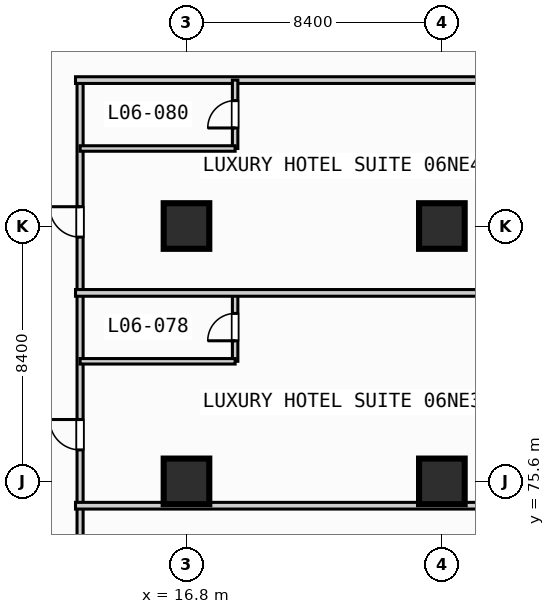
"""IFC4 building model, lengths in metres.
Left out: names, types, materials, properties, quantities, classifications, styles, units other than length and angle.
Written with IfcOpenShell. Run it as: python <this file> out.ifc"""

import sys

from ifc_helpers import new_model, si_unit, direction, frame, frame_2d, origin, origin_2d, place, context, subcontext, project, spatial, rectangle, extrude, element, fill, save


model = new_model("IFC4")
c1 = context("Model", 3, precision=1e-05, world=origin(), true_north=direction((0.0, 1.0)))
c2 = subcontext(c1, "Body", "Model", "MODEL_VIEW")
j1 = project(units=[si_unit("LENGTHUNIT", "METRE"), si_unit("PLANEANGLEUNIT", "RADIAN")], contexts=[c1])
p1 = place(None, origin())
s1 = spatial("IfcSite", under=j1, at=p1, CompositionType="ELEMENT")
p2 = place(p1, origin())
s2 = spatial("IfcBuilding", under=s1, at=p2, CompositionType="ELEMENT")
p3 = place(p2, frame((0.0, 0.0, 32.0)))
s3 = spatial("IfcBuildingStorey", under=s2, at=p3, CompositionType="ELEMENT", Elevation=32.0)
for number, where, z_axis, x_axis in (
    (1, (16.8, 75.6, 0.0), (0.0, 0.0, 1.0), (1.0, 0.0, 0.0)),
    (2, (16.8, 84.0, 0.0), (0.0, 0.0, 1.0), (1.0, 0.0, 0.0)),
    (3, (25.2, 75.6, 0.0), (0.0, 0.0, 1.0), (1.0, 0.0, 0.0)),
    (4, (25.2, 84.0, 0.0), (0.0, 0.0, 1.0), (1.0, 0.0, 0.0)),
):
    element("IfcColumn", number, at=place(p3, frame(where, z_axis=z_axis, x_axis=x_axis)), inside=s3, PredefinedType="COLUMN", context=c2, shape_type="SweptSolid", body=[
        extrude(rectangle(XDim=1.5, YDim=1.5, at=origin_2d()), origin(), (0.0, 0.0, 1.0), 3.8),
    ])
p4 = place(p3, frame((13.3, 61.6, 0.0), z_axis=(0.0, 0.0, 1.0), x_axis=(0.0, 1.0, 0.0)))
e5 = element("IfcWall", 5, at=p4, inside=s3, PredefinedType="PARTITIONING", context=c2, shape_type="SweptSolid", body=[
    extrude(rectangle(XDim=27.2, YDim=0.2, at=frame_2d((13.6, 0.0))), origin(), (0.0, 0.0, 1.0), 3.55),
])
p5 = place(p4, frame((3.965, 0.0, 0.0)))
e6 = element("IfcOpeningElement", 6, at=p5, cuts=e5, PredefinedType="OPENING", context=c2, shape_type="SweptSolid", body=[
    extrude(rectangle(XDim=1.0, YDim=2.15, at=frame_2d((0.5, 1.075))), frame((0.0, 0.11, 0.0), z_axis=(0.0, -1.0, 0.0), x_axis=(1.0, 0.0, 0.0)), (0.0, 0.0, 1.0), 0.22),
])
p6 = place(p4, frame((10.565, 0.0, 0.0)))
e7 = element("IfcOpeningElement", 7, at=p6, cuts=e5, PredefinedType="OPENING", context=c2, shape_type="SweptSolid", body=[
    extrude(rectangle(XDim=1.0, YDim=2.15, at=frame_2d((0.5, 1.075))), frame((0.0, 0.11, 0.0), z_axis=(0.0, -1.0, 0.0), x_axis=(1.0, 0.0, 0.0)), (0.0, 0.0, 1.0), 0.22),
])
p7 = place(p4, frame((15.035, 0.0, 0.0)))
e8 = element("IfcOpeningElement", 8, at=p7, cuts=e5, PredefinedType="OPENING", context=c2, shape_type="SweptSolid", body=[
    extrude(rectangle(XDim=1.0, YDim=2.15, at=frame_2d((0.5, 1.075))), frame((0.0, 0.11, 0.0), z_axis=(0.0, -1.0, 0.0), x_axis=(1.0, 0.0, 0.0)), (0.0, 0.0, 1.0), 0.22),
])
p8 = place(p4, frame((22.035, 0.0, 0.0)))
e9 = element("IfcOpeningElement", 9, at=p8, cuts=e5, PredefinedType="OPENING", context=c2, shape_type="SweptSolid", body=[
    extrude(rectangle(XDim=1.0, YDim=2.15, at=frame_2d((0.5, 1.075))), frame((0.0, 0.11, 0.0), z_axis=(0.0, -1.0, 0.0), x_axis=(1.0, 0.0, 0.0)), (0.0, 0.0, 1.0), 0.22),
])
p9 = place(p3, frame((13.15, 74.8, 0.0), z_axis=(0.0, 0.0, 1.0), x_axis=(1.0, 0.0, 0.0)))
e10 = element("IfcWall", 10, at=p9, inside=s3, PredefinedType="PARTITIONING", context=c2, shape_type="SweptSolid", body=[
    extrude(rectangle(XDim=20.28, YDim=0.22, at=frame_2d((10.14, 0.0))), origin(), (0.0, 0.0, 1.0), 3.55),
])
p10 = place(p3, frame((18.4, 79.55, 0.0), z_axis=(0.0, 0.0, 1.0), x_axis=(0.0, 1.0, 0.0)))
e11 = element("IfcWall", 11, at=p10, inside=s3, PredefinedType="PLUMBINGWALL", context=c2, shape_type="SweptSolid", body=[
    extrude(rectangle(XDim=2.25, YDim=0.18, at=frame_2d((1.125, 0.0))), origin(), (0.0, 0.0, 1.0), 3.55),
])
p11 = place(p10, frame((0.675, 0.0, 0.0)))
e12 = element("IfcOpeningElement", 12, at=p11, cuts=e11, PredefinedType="OPENING", context=c2, shape_type="SweptSolid", body=[
    extrude(rectangle(XDim=0.9, YDim=2.1, at=frame_2d((0.45, 1.05))), frame((0.0, 0.1, 0.0), z_axis=(0.0, -1.0, 0.0), x_axis=(1.0, 0.0, 0.0)), (0.0, 0.0, 1.0), 0.2),
])
p12 = place(p3, frame((13.3, 79.55, 0.0), z_axis=(0.0, 0.0, 1.0), x_axis=(1.0, 0.0, 0.0)))
e13 = element("IfcWall", 13, at=p12, inside=s3, PredefinedType="PLUMBINGWALL", context=c2, shape_type="SweptSolid", body=[
    extrude(rectangle(XDim=5.1, YDim=0.18, at=frame_2d((2.55, 0.0))), origin(), (0.0, 0.0, 1.0), 3.55),
])
for number, where, z_axis, x_axis in (
    (14, (13.15, 81.8, 0.0), (0.0, 0.0, 1.0), (1.0, 0.0, 0.0)),
    (15, (13.15, 88.8, 0.0), (0.0, 0.0, 1.0), (1.0, 0.0, 0.0)),
):
    element("IfcWall", number, at=place(p3, frame(where, z_axis=z_axis, x_axis=x_axis)), inside=s3, PredefinedType="PARTITIONING", context=c2, shape_type="SweptSolid", body=[
        extrude(rectangle(XDim=20.28, YDim=0.22, at=frame_2d((10.14, 0.0))), origin(), (0.0, 0.0, 1.0), 3.55),
    ])
p13 = place(p3, frame((18.4, 86.55, 0.0), z_axis=(0.0, 0.0, 1.0), x_axis=(0.0, 1.0, 0.0)))
e16 = element("IfcWall", 16, at=p13, inside=s3, PredefinedType="PLUMBINGWALL", context=c2, shape_type="SweptSolid", body=[
    extrude(rectangle(XDim=2.25, YDim=0.18, at=frame_2d((1.125, 0.0))), origin(), (0.0, 0.0, 1.0), 3.55),
])
p14 = place(p13, frame((0.675, 0.0, 0.0)))
e17 = element("IfcOpeningElement", 17, at=p14, cuts=e16, PredefinedType="OPENING", context=c2, shape_type="SweptSolid", body=[
    extrude(rectangle(XDim=0.9, YDim=2.1, at=frame_2d((0.45, 1.05))), frame((0.0, 0.1, 0.0), z_axis=(0.0, -1.0, 0.0), x_axis=(1.0, 0.0, 0.0)), (0.0, 0.0, 1.0), 0.2),
])
p15 = place(p3, frame((13.3, 86.55, 0.0), z_axis=(0.0, 0.0, 1.0), x_axis=(1.0, 0.0, 0.0)))
e18 = element("IfcWall", 18, at=p15, inside=s3, PredefinedType="PLUMBINGWALL", context=c2, shape_type="SweptSolid", body=[
    extrude(rectangle(XDim=5.1, YDim=0.18, at=frame_2d((2.55, 0.0))), origin(), (0.0, 0.0, 1.0), 3.55),
])
p16 = place(p7, origin())
e19 = element("IfcDoor", 19, at=p16, inside=s3, OperationType="SINGLE_SWING_RIGHT", PredefinedType="DOOR", context=c2, shape_type="SweptSolid", body=[
    extrude(rectangle(XDim=1.0, YDim=2.15, at=frame_2d((0.5, 1.075))), frame((0.0, 0.025, 0.0), z_axis=(0.0, -1.0, 0.0), x_axis=(1.0, 0.0, 0.0)), (0.0, 0.0, 1.0), 0.05),
])
fill(e8, e19)
p17 = place(p8, origin())
e20 = element("IfcDoor", 20, at=p17, inside=s3, OperationType="SINGLE_SWING_RIGHT", PredefinedType="DOOR", context=c2, shape_type="SweptSolid", body=[
    extrude(rectangle(XDim=1.0, YDim=2.15, at=frame_2d((0.5, 1.075))), frame((0.0, 0.025, 0.0), z_axis=(0.0, -1.0, 0.0), x_axis=(1.0, 0.0, 0.0)), (0.0, 0.0, 1.0), 0.05),
])
fill(e9, e20)
p18 = place(p11, origin())
e21 = element("IfcDoor", 21, at=p18, inside=s3, OperationType="SINGLE_SWING_LEFT", PredefinedType="DOOR", context=c2, shape_type="SweptSolid", body=[
    extrude(rectangle(XDim=0.9, YDim=2.1, at=frame_2d((0.45, 1.05))), frame((0.0, 0.025, 0.0), z_axis=(0.0, -1.0, 0.0), x_axis=(1.0, 0.0, 0.0)), (0.0, 0.0, 1.0), 0.05),
])
fill(e12, e21)
p19 = place(p14, origin())
e22 = element("IfcDoor", 22, at=p19, inside=s3, OperationType="SINGLE_SWING_LEFT", PredefinedType="DOOR", context=c2, shape_type="SweptSolid", body=[
    extrude(rectangle(XDim=0.9, YDim=2.1, at=frame_2d((0.45, 1.05))), frame((0.0, 0.025, 0.0), z_axis=(0.0, -1.0, 0.0), x_axis=(1.0, 0.0, 0.0)), (0.0, 0.0, 1.0), 0.05),
])
fill(e17, e22)
save(model, sys.argv[1])
